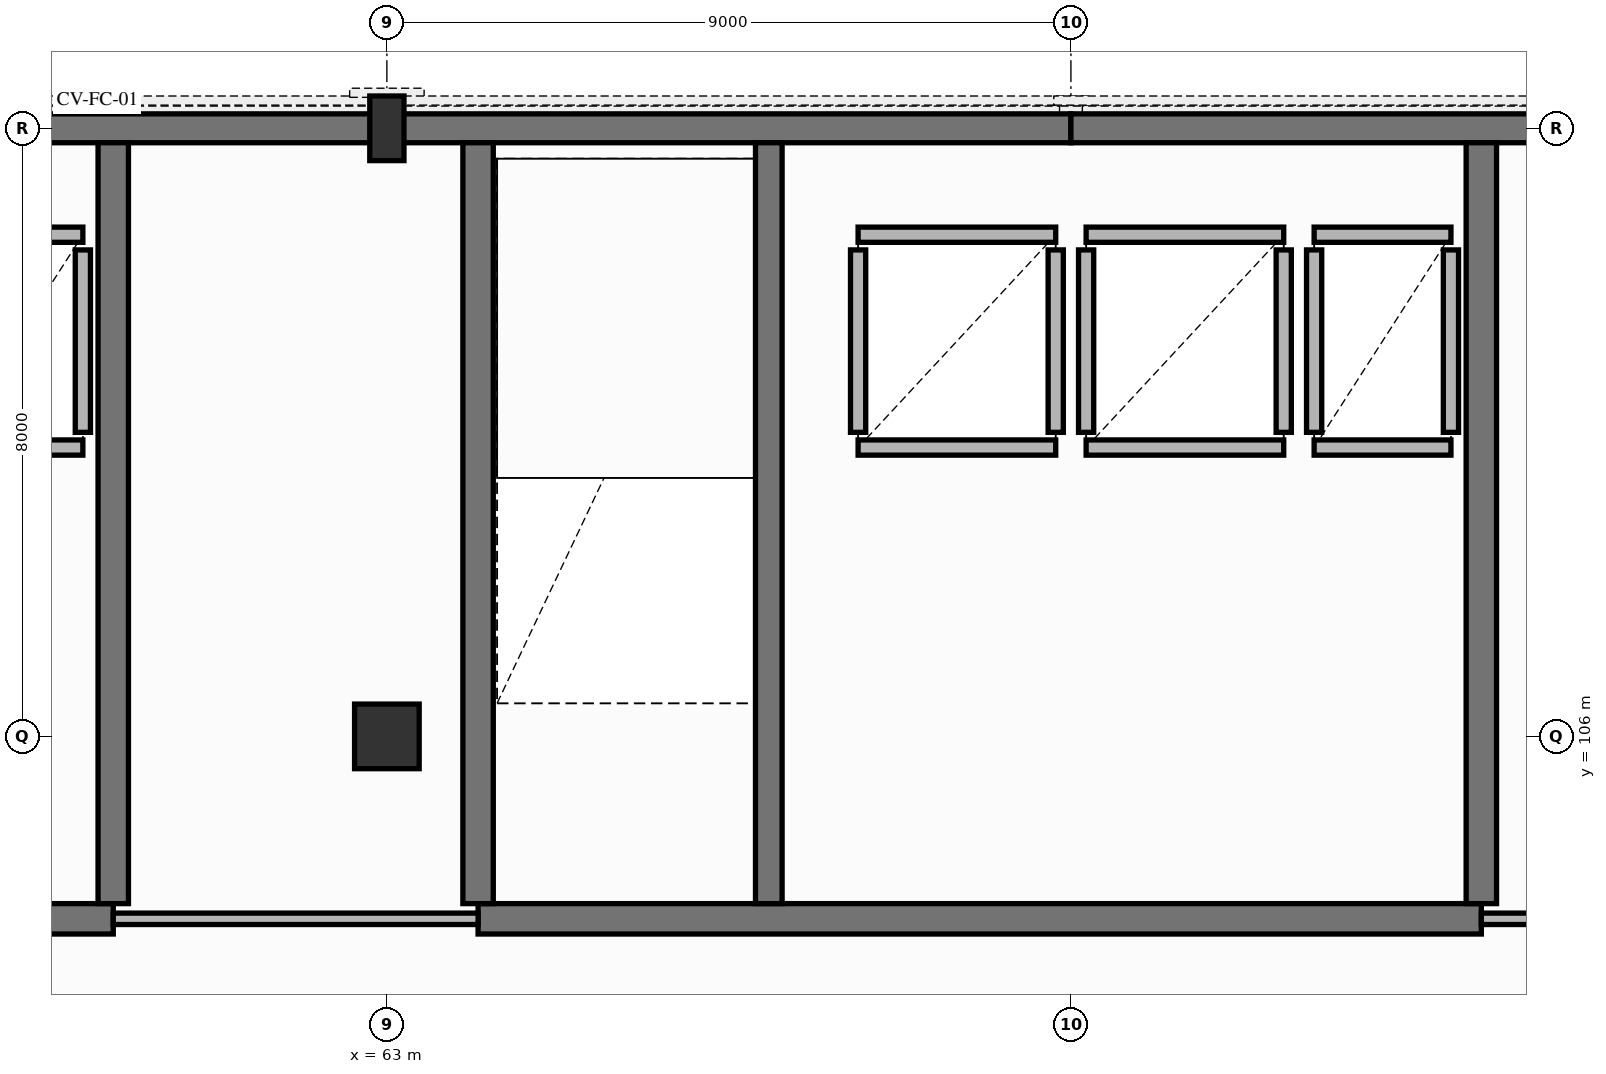
"""IFC4 building model, lengths in metres.
Left out: names, types, materials, properties, quantities, classifications, styles, units other than length and angle.
Written with IfcOpenShell. Run it as: python <this file> out.ifc"""

import sys

from ifc_helpers import new_model, si_unit, direction, frame, frame_2d, origin, origin_2d, place, context, subcontext, project, spatial, rectangle, extrude, element, fill, save


model = new_model("IFC4")
c1 = context("Model", 3, precision=1e-05, world=origin(), true_north=direction((0.0, 1.0)))
c2 = subcontext(c1, "Body", "Model", "MODEL_VIEW")
j1 = project(units=[si_unit("LENGTHUNIT", "METRE"), si_unit("PLANEANGLEUNIT", "RADIAN")], contexts=[c1])
p1 = place(None, origin())
s1 = spatial("IfcSite", under=j1, at=p1, CompositionType="ELEMENT")
p2 = place(p1, origin())
s2 = spatial("IfcBuilding", under=s1, at=p2, CompositionType="ELEMENT")
p3 = place(p2, frame((0.0, 0.0, 5.1)))
s3 = spatial("IfcBuildingStorey", under=s2, at=p3, CompositionType="ELEMENT", Elevation=5.1)
p4 = place(p3, frame((63.0, 106.0, 0.0), z_axis=(0.0, 0.0, 1.0), x_axis=(1.0, 0.0, 0.0)))
e1 = element("IfcColumn", 1, at=p4, inside=s3, PredefinedType="COLUMN", context=c2, shape_type="SweptSolid", body=[
    extrude(rectangle(XDim=0.85, YDim=0.85, at=origin_2d()), origin(), (0.0, 0.0, 1.0), 3.84),
])
p5 = place(p3, frame((63.0, 114.0, 0.0), z_axis=(0.0, 0.0, 1.0), x_axis=(0.0, 1.0, 0.0)))
e2 = element("IfcColumn", 2, at=p5, inside=s3, PredefinedType="COLUMN", context=c2, shape_type="SweptSolid", body=[
    extrude(rectangle(XDim=0.45, YDim=0.85, at=origin_2d()), origin(), (0.0, 0.0, 1.0), 3.84),
])
for number, where, z_axis, x_axis in (
    (3, (54.0, 114.0, 0.0), (0.0, 0.0, 1.0), (1.0, 0.0, 0.0)),
    (4, (63.0, 114.0, 0.0), (0.0, 0.0, 1.0), (1.0, 0.0, 0.0)),
    (5, (72.0, 114.0, 0.0), (0.0, 0.0, 1.0), (1.0, 0.0, 0.0)),
):
    element("IfcWall", number, at=place(p3, frame(where, z_axis=z_axis, x_axis=x_axis)), inside=s3, PredefinedType="SOLIDWALL", context=c2, shape_type="SweptSolid", body=[
        extrude(rectangle(XDim=9.0, YDim=0.38, at=frame_2d((4.5, 0.0))), origin(), (0.0, 0.0, 1.0), 3.55),
    ])
p6 = place(p3, frame((46.2, 103.6, 0.0), z_axis=(0.0, 0.0, 1.0), x_axis=(1.0, 0.0, 0.0)))
e6 = element("IfcWall", 6, at=p6, inside=s3, PredefinedType="SHEAR", context=c2, shape_type="SweptSolid", body=[
    extrude(rectangle(XDim=13.2, YDim=0.4, at=frame_2d((6.6, 0.0))), origin(), (0.0, 0.0, 1.0), 3.55),
])
p7 = place(p6, frame((5.8, 0.0, 0.0)))
e7 = element("IfcOpeningElement", 7, at=p7, cuts=e6, PredefinedType="OPENING", context=c2, shape_type="SweptSolid", body=[
    extrude(rectangle(XDim=1.5, YDim=2.2, at=frame_2d((0.75, 1.1))), frame((0.0, 0.21, 0.0), z_axis=(0.0, -1.0, 0.0), x_axis=(1.0, 0.0, 0.0)), (0.0, 0.0, 1.0), 0.42),
])
p8 = place(p3, frame((59.4, 103.8, 0.0), z_axis=(0.0, 0.0, 1.0), x_axis=(0.0, 1.0, 0.0)))
e8 = element("IfcWall", 8, at=p8, inside=s3, PredefinedType="SHEAR", context=c2, shape_type="SweptSolid", body=[
    extrude(rectangle(XDim=10.01, YDim=0.4, at=frame_2d((5.005, 0.0))), origin(), (0.0, 0.0, 1.0), 3.55),
])
p9 = place(p3, frame((57.2, 109.8, 0.0), z_axis=(0.0, 0.0, 1.0), x_axis=(1.0, 0.0, 0.0)))
e9 = element("IfcWall", 9, at=p9, inside=s3, PredefinedType="PARTITIONING", context=c2, shape_type="SweptSolid", body=[
    extrude(rectangle(XDim=1.8, YDim=0.2, at=frame_2d((0.9, 0.0))), origin(), (0.0, 0.0, 1.0), 3.55),
])
p10 = place(p9, frame((0.45, 0.0, 0.0)))
e10 = element("IfcOpeningElement", 10, at=p10, cuts=e9, PredefinedType="OPENING", context=c2, shape_type="SweptSolid", body=[
    extrude(rectangle(XDim=0.9, YDim=2.1, at=frame_2d((0.45, 1.05))), frame((0.0, 0.11, 0.0), z_axis=(0.0, -1.0, 0.0), x_axis=(1.0, 0.0, 0.0)), (0.0, 0.0, 1.0), 0.22),
])
p11 = place(p3, frame((57.2, 112.6, 0.0), z_axis=(0.0, 0.0, 1.0), x_axis=(1.0, 0.0, 0.0)))
e11 = element("IfcWall", 11, at=p11, inside=s3, PredefinedType="PARTITIONING", context=c2, shape_type="SweptSolid", body=[
    extrude(rectangle(XDim=1.8, YDim=0.2, at=frame_2d((0.9, 0.0))), origin(), (0.0, 0.0, 1.0), 3.55),
])
p12 = place(p3, frame((59.0, 110.0, 0.0), z_axis=(0.0, 0.0, 1.0), x_axis=(0.0, 1.0, 0.0)))
e12 = element("IfcWall", 12, at=p12, inside=s3, PredefinedType="PARTITIONING", context=c2, shape_type="SweptSolid", body=[
    extrude(rectangle(XDim=2.4, YDim=0.2, at=frame_2d((1.2, 0.0))), origin(), (0.0, 0.0, 1.0), 3.55),
])
p13 = place(p3, frame((64.2, 103.6, 0.0), z_axis=(0.0, 0.0, 1.0), x_axis=(1.0, 0.0, 0.0)))
e13 = element("IfcWall", 13, at=p13, inside=s3, PredefinedType="SHEAR", context=c2, shape_type="SweptSolid", body=[
    extrude(rectangle(XDim=13.2, YDim=0.4, at=frame_2d((6.6, 0.0))), origin(), (0.0, 0.0, 1.0), 3.55),
])
p14 = place(p13, frame((5.8, 0.0, 0.0)))
e14 = element("IfcOpeningElement", 14, at=p14, cuts=e13, PredefinedType="OPENING", context=c2, shape_type="SweptSolid", body=[
    extrude(rectangle(XDim=1.5, YDim=2.2, at=frame_2d((0.75, 1.1))), frame((0.0, 0.21, 0.0), z_axis=(0.0, -1.0, 0.0), x_axis=(1.0, 0.0, 0.0)), (0.0, 0.0, 1.0), 0.42),
])
for number, where, z_axis, x_axis in (
    (15, (64.2, 103.8, 0.0), (0.0, 0.0, 1.0), (0.0, 1.0, 0.0)),
    (16, (77.4, 103.8, 0.0), (0.0, 0.0, 1.0), (0.0, 1.0, 0.0)),
):
    element("IfcWall", number, at=place(p3, frame(where, z_axis=z_axis, x_axis=x_axis)), inside=s3, PredefinedType="SHEAR", context=c2, shape_type="SweptSolid", body=[
        extrude(rectangle(XDim=10.01, YDim=0.4, at=frame_2d((5.005, 0.0))), origin(), (0.0, 0.0, 1.0), 3.55),
    ])
p15 = place(p3, frame((68.025, 103.8, 0.0), z_axis=(0.0, 0.0, 1.0), x_axis=(0.0, 1.0, 0.0)))
e17 = element("IfcWall", 17, at=p15, inside=s3, PredefinedType="SHEAR", context=c2, shape_type="SweptSolid", body=[
    extrude(rectangle(XDim=10.01, YDim=0.35, at=frame_2d((5.005, 0.0))), origin(), (0.0, 0.0, 1.0), 3.55),
])
p16 = place(p15, frame((0.45, 0.0, 0.0)))
e18 = element("IfcOpeningElement", 18, at=p16, cuts=e17, PredefinedType="OPENING", context=c2, shape_type="SweptSolid", body=[
    extrude(rectangle(XDim=1.05, YDim=2.2, at=frame_2d((0.525, 1.1))), frame((0.0, 0.185, 0.0), z_axis=(0.0, -1.0, 0.0), x_axis=(1.0, 0.0, 0.0)), (0.0, 0.0, 1.0), 0.37),
])
p17 = place(p3, frame((69.2, 109.8, 0.0), z_axis=(0.0, 0.0, 1.0), x_axis=(1.0, 0.0, 0.0)))
e19 = element("IfcWall", 19, at=p17, inside=s3, PredefinedType="PARTITIONING", context=c2, shape_type="SweptSolid", body=[
    extrude(rectangle(XDim=2.6, YDim=0.2, at=frame_2d((1.3, 0.0))), origin(), (0.0, 0.0, 1.0), 3.55),
])
p18 = place(p17, frame((0.75, 0.0, 0.0)))
e20 = element("IfcOpeningElement", 20, at=p18, cuts=e19, PredefinedType="OPENING", context=c2, shape_type="SweptSolid", body=[
    extrude(rectangle(XDim=1.1, YDim=2.15, at=frame_2d((0.55, 1.075))), frame((0.0, 0.11, 0.0), z_axis=(0.0, -1.0, 0.0), x_axis=(1.0, 0.0, 0.0)), (0.0, 0.0, 1.0), 0.22),
])
p19 = place(p3, frame((69.2, 112.6, 0.0), z_axis=(0.0, 0.0, 1.0), x_axis=(1.0, 0.0, 0.0)))
e21 = element("IfcWall", 21, at=p19, inside=s3, PredefinedType="PARTITIONING", context=c2, shape_type="SweptSolid", body=[
    extrude(rectangle(XDim=2.6, YDim=0.2, at=frame_2d((1.3, 0.0))), origin(), (0.0, 0.0, 1.0), 3.55),
])
for number, where, z_axis, x_axis in (
    (22, (69.2, 110.0, 0.0), (0.0, 0.0, 1.0), (0.0, 1.0, 0.0)),
    (23, (71.8, 110.0, 0.0), (0.0, 0.0, 1.0), (0.0, 1.0, 0.0)),
):
    element("IfcWall", number, at=place(p3, frame(where, z_axis=z_axis, x_axis=x_axis)), inside=s3, PredefinedType="PARTITIONING", context=c2, shape_type="SweptSolid", body=[
        extrude(rectangle(XDim=2.4, YDim=0.2, at=frame_2d((1.2, 0.0))), origin(), (0.0, 0.0, 1.0), 3.55),
    ])
p20 = place(p3, frame((72.2, 109.8, 0.0), z_axis=(0.0, 0.0, 1.0), x_axis=(1.0, 0.0, 0.0)))
e24 = element("IfcWall", 24, at=p20, inside=s3, PredefinedType="PARTITIONING", context=c2, shape_type="SweptSolid", body=[
    extrude(rectangle(XDim=2.6, YDim=0.2, at=frame_2d((1.3, 0.0))), origin(), (0.0, 0.0, 1.0), 3.55),
])
p21 = place(p20, frame((0.75, 0.0, 0.0)))
e25 = element("IfcOpeningElement", 25, at=p21, cuts=e24, PredefinedType="OPENING", context=c2, shape_type="SweptSolid", body=[
    extrude(rectangle(XDim=1.1, YDim=2.15, at=frame_2d((0.55, 1.075))), frame((0.0, 0.11, 0.0), z_axis=(0.0, -1.0, 0.0), x_axis=(1.0, 0.0, 0.0)), (0.0, 0.0, 1.0), 0.22),
])
p22 = place(p3, frame((72.2, 112.6, 0.0), z_axis=(0.0, 0.0, 1.0), x_axis=(1.0, 0.0, 0.0)))
e26 = element("IfcWall", 26, at=p22, inside=s3, PredefinedType="PARTITIONING", context=c2, shape_type="SweptSolid", body=[
    extrude(rectangle(XDim=2.6, YDim=0.2, at=frame_2d((1.3, 0.0))), origin(), (0.0, 0.0, 1.0), 3.55),
])
for number, where, z_axis, x_axis in (
    (27, (72.2, 110.0, 0.0), (0.0, 0.0, 1.0), (0.0, 1.0, 0.0)),
    (28, (74.8, 110.0, 0.0), (0.0, 0.0, 1.0), (0.0, 1.0, 0.0)),
):
    element("IfcWall", number, at=place(p3, frame(where, z_axis=z_axis, x_axis=x_axis)), inside=s3, PredefinedType="PARTITIONING", context=c2, shape_type="SweptSolid", body=[
        extrude(rectangle(XDim=2.4, YDim=0.2, at=frame_2d((1.2, 0.0))), origin(), (0.0, 0.0, 1.0), 3.55),
    ])
p23 = place(p3, frame((75.2, 109.8, 0.0), z_axis=(0.0, 0.0, 1.0), x_axis=(1.0, 0.0, 0.0)))
e29 = element("IfcWall", 29, at=p23, inside=s3, PredefinedType="PARTITIONING", context=c2, shape_type="SweptSolid", body=[
    extrude(rectangle(XDim=1.8, YDim=0.2, at=frame_2d((0.9, 0.0))), origin(), (0.0, 0.0, 1.0), 3.55),
])
p24 = place(p23, frame((0.45, 0.0, 0.0)))
e30 = element("IfcOpeningElement", 30, at=p24, cuts=e29, PredefinedType="OPENING", context=c2, shape_type="SweptSolid", body=[
    extrude(rectangle(XDim=0.9, YDim=2.1, at=frame_2d((0.45, 1.05))), frame((0.0, 0.11, 0.0), z_axis=(0.0, -1.0, 0.0), x_axis=(1.0, 0.0, 0.0)), (0.0, 0.0, 1.0), 0.22),
])
p25 = place(p3, frame((75.2, 112.6, 0.0), z_axis=(0.0, 0.0, 1.0), x_axis=(1.0, 0.0, 0.0)))
e31 = element("IfcWall", 31, at=p25, inside=s3, PredefinedType="PARTITIONING", context=c2, shape_type="SweptSolid", body=[
    extrude(rectangle(XDim=1.8, YDim=0.2, at=frame_2d((0.9, 0.0))), origin(), (0.0, 0.0, 1.0), 3.55),
])
for number, where, z_axis, x_axis in (
    (32, (75.2, 110.0, 0.0), (0.0, 0.0, 1.0), (0.0, 1.0, 0.0)),
    (33, (77.0, 110.0, 0.0), (0.0, 0.0, 1.0), (0.0, 1.0, 0.0)),
):
    element("IfcWall", number, at=place(p3, frame(where, z_axis=z_axis, x_axis=x_axis)), inside=s3, PredefinedType="PARTITIONING", context=c2, shape_type="SweptSolid", body=[
        extrude(rectangle(XDim=2.4, YDim=0.2, at=frame_2d((1.2, 0.0))), origin(), (0.0, 0.0, 1.0), 3.55),
    ])
p26 = place(p3, frame((59.4, 103.6, 0.0), z_axis=(0.0, 0.0, 1.0), x_axis=(1.0, 0.0, 0.0)))
e34 = element("IfcWall", 34, at=p26, inside=s3, PredefinedType="PARTITIONING", context=c2, shape_type="SweptSolid", body=[
    extrude(rectangle(XDim=4.8, YDim=0.15, at=frame_2d((2.4, 0.0))), origin(), (0.0, 0.0, 1.0), 3.55),
])
p27 = place(p26, frame((1.6, 0.0, 0.0)))
e35 = element("IfcOpeningElement", 35, at=p27, cuts=e34, PredefinedType="OPENING", context=c2, shape_type="SweptSolid", body=[
    extrude(rectangle(XDim=1.0, YDim=2.15, at=frame_2d((0.5, 1.075))), frame((0.0, 0.085, 0.0), z_axis=(0.0, -1.0, 0.0), x_axis=(1.0, 0.0, 0.0)), (0.0, 0.0, 1.0), 0.17),
])
p28 = place(p3, frame((77.4, 103.6, 0.0), z_axis=(0.0, 0.0, 1.0), x_axis=(1.0, 0.0, 0.0)))
e36 = element("IfcWall", 36, at=p28, inside=s3, PredefinedType="PARTITIONING", context=c2, shape_type="SweptSolid", body=[
    extrude(rectangle(XDim=30.6, YDim=0.15, at=frame_2d((15.3, 0.0))), origin(), (0.0, 0.0, 1.0), 3.55),
])
p29 = place(p28, frame((14.6, 0.0, 0.0)))
e37 = element("IfcOpeningElement", 37, at=p29, cuts=e36, PredefinedType="OPENING", context=c2, shape_type="SweptSolid", body=[
    extrude(rectangle(XDim=1.0, YDim=2.15, at=frame_2d((0.5, 1.075))), frame((0.0, 0.085, 0.0), z_axis=(0.0, -1.0, 0.0), x_axis=(1.0, 0.0, 0.0)), (0.0, 0.0, 1.0), 0.17),
])
p30 = place(p14, origin())
e38 = element("IfcDoor", 38, at=p30, inside=s3, OperationType="DOUBLE_DOOR_SINGLE_SWING", PredefinedType="DOOR", context=c2, shape_type="SweptSolid", body=[
    extrude(rectangle(XDim=1.5, YDim=2.2, at=frame_2d((0.75, 1.1))), frame((0.0, 0.025, 0.0), z_axis=(0.0, -1.0, 0.0), x_axis=(1.0, 0.0, 0.0)), (0.0, 0.0, 1.0), 0.05),
])
fill(e14, e38)
p31 = place(p16, origin())
e39 = element("IfcDoor", 39, at=p31, inside=s3, OperationType="SINGLE_SWING_RIGHT", PredefinedType="DOOR", context=c2, shape_type="SweptSolid", body=[
    extrude(rectangle(XDim=1.05, YDim=2.2, at=frame_2d((0.525, 1.1))), frame((0.0, 0.025, 0.0), z_axis=(0.0, -1.0, 0.0), x_axis=(1.0, 0.0, 0.0)), (0.0, 0.0, 1.0), 0.05),
])
fill(e18, e39)
p32 = place(p18, origin())
e40 = element("IfcDoor", 40, at=p32, inside=s3, OperationType="SLIDING_TO_LEFT", PredefinedType="DOOR", context=c2, shape_type="SweptSolid", body=[
    extrude(rectangle(XDim=1.1, YDim=2.15, at=frame_2d((0.55, 1.075))), frame((0.0, 0.025, 0.0), z_axis=(0.0, -1.0, 0.0), x_axis=(1.0, 0.0, 0.0)), (0.0, 0.0, 1.0), 0.05),
])
fill(e20, e40)
p33 = place(p21, origin())
e41 = element("IfcDoor", 41, at=p33, inside=s3, OperationType="SLIDING_TO_RIGHT", PredefinedType="DOOR", context=c2, shape_type="SweptSolid", body=[
    extrude(rectangle(XDim=1.1, YDim=2.15, at=frame_2d((0.55, 1.075))), frame((0.0, 0.025, 0.0), z_axis=(0.0, -1.0, 0.0), x_axis=(1.0, 0.0, 0.0)), (0.0, 0.0, 1.0), 0.05),
])
fill(e25, e41)
p34 = place(p24, origin())
e42 = element("IfcDoor", 42, at=p34, inside=s3, OperationType="SINGLE_SWING_RIGHT", PredefinedType="DOOR", context=c2, shape_type="SweptSolid", body=[
    extrude(rectangle(XDim=0.9, YDim=2.1, at=frame_2d((0.45, 1.05))), frame((0.0, 0.025, 0.0), z_axis=(0.0, -1.0, 0.0), x_axis=(1.0, 0.0, 0.0)), (0.0, 0.0, 1.0), 0.05),
])
fill(e30, e42)
p35 = place(p27, origin())
e43 = element("IfcDoor", 43, at=p35, inside=s3, OperationType="SINGLE_SWING_LEFT", PredefinedType="DOOR", context=c2, shape_type="SweptSolid", body=[
    extrude(rectangle(XDim=1.0, YDim=2.15, at=frame_2d((0.5, 1.075))), frame((0.0, 0.025, 0.0), z_axis=(0.0, -1.0, 0.0), x_axis=(1.0, 0.0, 0.0)), (0.0, 0.0, 1.0), 0.05),
])
fill(e35, e43)
save(model, sys.argv[1])
